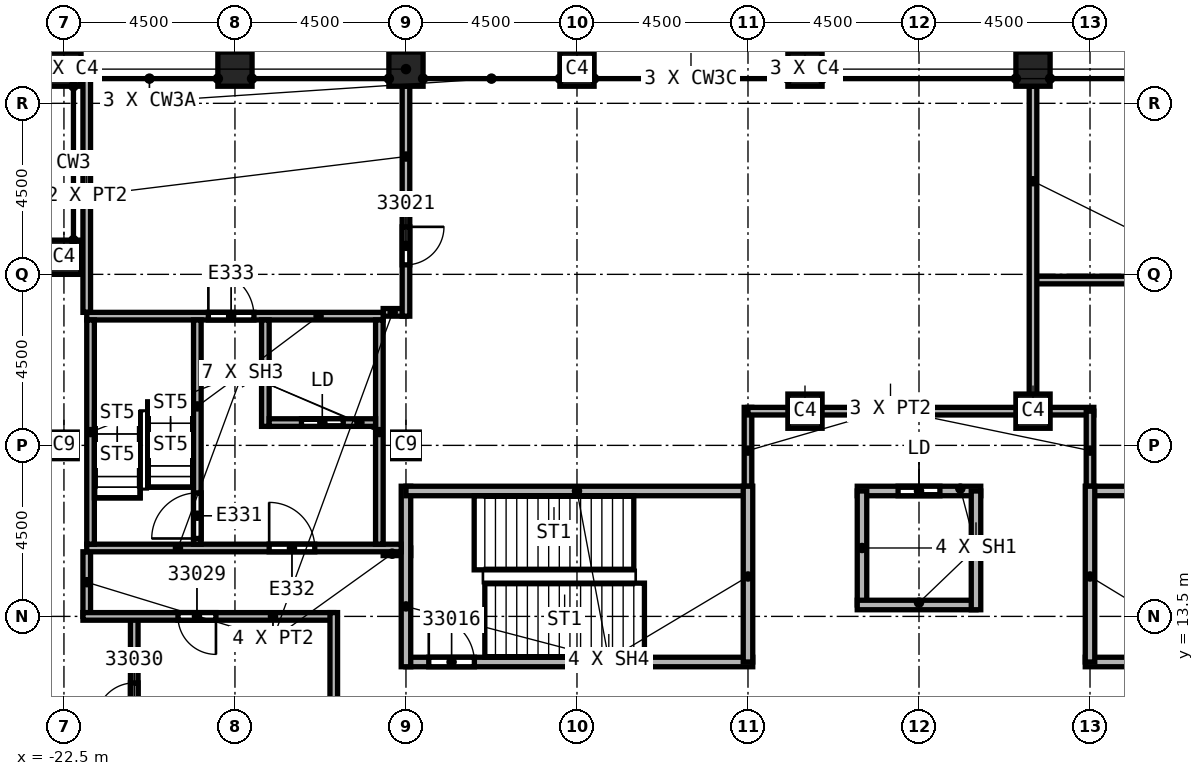
"""IFC4 building model, lengths in metres.
Left out: names, types, materials, properties, quantities, classifications, styles, units other than length and angle.
Written with IfcOpenShell. Run it as: python <this file> out.ifc"""

import sys

from ifc_helpers import new_model, si_unit, direction, frame, frame_2d, origin, origin_2d, place, context, subcontext, project, spatial, rectangle, extrude, element, fill, save


model = new_model("IFC4")
c1 = context("Model", 3, precision=1e-05, world=origin(), true_north=direction((0.0, 1.0)))
c2 = subcontext(c1, "Body", "Model", "MODEL_VIEW")
j1 = project(units=[si_unit("LENGTHUNIT", "METRE"), si_unit("PLANEANGLEUNIT", "RADIAN")], contexts=[c1])
p1 = place(None, origin())
s1 = spatial("IfcSite", under=j1, at=p1, CompositionType="ELEMENT")
p2 = place(p1, origin())
s2 = spatial("IfcBuilding", under=s1, at=p2, CompositionType="ELEMENT")
p3 = place(p2, frame((0.0, 0.0, 361.0)))
s3 = spatial("IfcBuildingStorey", under=s2, at=p3, CompositionType="ELEMENT", Elevation=361.0)
for number, where, z_axis, x_axis in (
    (1, (-13.5, 18.0, 0.0), (0.0, 0.0, 1.0), (1.0, 0.0, 0.0)),
    (2, (-22.5, 18.0, 0.0), (0.0, 0.0, 1.0), (1.0, 0.0, 0.0)),
):
    element("IfcColumn", number, at=place(p3, frame(where, z_axis=z_axis, x_axis=x_axis)), inside=s3, PredefinedType="COLUMN", context=c2, shape_type="SweptSolid", body=[
        extrude(rectangle(XDim=0.7, YDim=0.7, at=origin_2d()), origin(), (0.0, 0.0, 1.0), 4.6),
    ])
for number, where, z_axis, x_axis in (
    (3, (3.0, 27.9, 0.0), (0.0, 0.0, 1.0), (1.0, 0.0, 0.0)),
    (4, (-3.0, 27.9, 0.0), (0.0, 0.0, 1.0), (1.0, 0.0, 0.0)),
    (5, (-9.0, 27.9, 0.0), (0.0, 0.0, 1.0), (1.0, 0.0, 0.0)),
    (6, (-13.5, 27.9, 0.0), (0.0, 0.0, 1.0), (1.0, 0.0, 0.0)),
    (7, (-18.0, 27.9, 0.0), (0.0, 0.0, 1.0), (1.0, 0.0, 0.0)),
    (8, (-22.5, 27.9, 0.0), (0.0, 0.0, 1.0), (1.0, 0.0, 0.0)),
    (9, (3.0, 18.9, 0.0), (0.0, 0.0, 1.0), (1.0, 0.0, 0.0)),
    (10, (-3.0, 18.9, 0.0), (0.0, 0.0, 1.0), (1.0, 0.0, 0.0)),
    (11, (-22.5, 22.95, 0.0), (0.0, 0.0, 1.0), (1.0, 0.0, 0.0)),
):
    element("IfcColumn", number, at=place(p3, frame(where, z_axis=z_axis, x_axis=x_axis)), inside=s3, PredefinedType="COLUMN", context=c2, shape_type="SweptSolid", body=[
        extrude(rectangle(XDim=0.9, YDim=0.9, at=origin_2d()), origin(), (0.0, 0.0, 1.0), 4.6),
    ])
p4 = place(p3, frame((-21.9, 13.5, 0.0), z_axis=(0.0, 0.0, 1.0), x_axis=(0.0, 1.0, 0.0)))
e12 = element("IfcWall", 12, at=p4, inside=s3, PredefinedType="PARTITIONING", context=c2, shape_type="SweptSolid", body=[
    extrude(rectangle(XDim=1.7, YDim=0.2, at=frame_2d((0.85, 0.0))), origin(), (0.0, 0.0, 1.0), 4.15),
])
p5 = place(p3, frame((-21.9, 21.5, 0.0), z_axis=(0.0, 0.0, 1.0), x_axis=(0.0, 1.0, 0.0)))
e13 = element("IfcWall", 13, at=p5, inside=s3, PredefinedType="PARTITIONING", context=c2, shape_type="SweptSolid", body=[
    extrude(rectangle(XDim=6.136, YDim=0.2, at=frame_2d((3.068, 0.0))), origin(), (0.0, 0.0, 1.0), 4.15),
])
p6 = place(p3, frame((-20.65, 9.0, 0.0), z_axis=(0.0, 0.0, 1.0), x_axis=(0.0, 1.0, 0.0)))
e14 = element("IfcWall", 14, at=p6, inside=s3, PredefinedType="PARTITIONING", context=c2, shape_type="SweptSolid", body=[
    extrude(rectangle(XDim=4.5, YDim=0.2, at=frame_2d((2.25, 0.0))), origin(), (0.0, 0.0, 1.0), 4.15),
])
p7 = place(p6, frame((1.75, 0.0, 0.0)))
e15 = element("IfcOpeningElement", 15, at=p7, cuts=e14, PredefinedType="OPENING", context=c2, shape_type="SweptSolid", body=[
    extrude(rectangle(XDim=1.0, YDim=2.1, at=frame_2d((0.5, 1.05))), frame((0.0, 0.1, 0.0), z_axis=(0.0, -1.0, 0.0), x_axis=(1.0, 0.0, 0.0)), (0.0, 0.0, 1.0), 0.2),
])
p8 = place(p3, frame((-15.4, 13.5, 0.0), z_axis=(0.0, 0.0, 1.0), x_axis=(-1.0, 0.0, 0.0)))
e16 = element("IfcWall", 16, at=p8, inside=s3, PredefinedType="PARTITIONING", context=c2, shape_type="SweptSolid", body=[
    extrude(rectangle(XDim=6.6, YDim=0.2, at=frame_2d((3.3, 0.0))), origin(), (0.0, 0.0, 1.0), 4.15),
])
p9 = place(p8, frame((3.1, 0.0, 0.0)))
e17 = element("IfcOpeningElement", 17, at=p9, cuts=e16, PredefinedType="OPENING", context=c2, shape_type="SweptSolid", body=[
    extrude(rectangle(XDim=1.0, YDim=2.1, at=frame_2d((0.5, 1.05))), frame((0.0, 0.1, 0.0), z_axis=(0.0, -1.0, 0.0), x_axis=(1.0, 0.0, 0.0)), (0.0, 0.0, 1.0), 0.2),
])
p10 = place(p3, frame((-15.4, -27.636, 0.0), z_axis=(0.0, 0.0, 1.0), x_axis=(0.0, 1.0, 0.0)))
e18 = element("IfcWall", 18, at=p10, inside=s3, PredefinedType="PARTITIONING", context=c2, shape_type="SweptSolid", body=[
    extrude(rectangle(XDim=41.236, YDim=0.2, at=frame_2d((20.618, 0.0))), origin(), (0.0, 0.0, 1.0), 4.15),
])
p11 = place(p10, frame((30.936, 0.0, 0.0)))
e19 = element("IfcOpeningElement", 19, at=p11, cuts=e18, PredefinedType="OPENING", context=c2, shape_type="SweptSolid", body=[
    extrude(rectangle(XDim=1.0, YDim=2.1, at=frame_2d((0.5, 1.05))), frame((0.0, 0.1, 0.0), z_axis=(0.0, -1.0, 0.0), x_axis=(1.0, 0.0, 0.0)), (0.0, 0.0, 1.0), 0.2),
])
p12 = place(p10, frame((35.436, 0.0, 0.0)))
e20 = element("IfcOpeningElement", 20, at=p12, cuts=e18, PredefinedType="OPENING", context=c2, shape_type="SweptSolid", body=[
    extrude(rectangle(XDim=1.0, YDim=2.1, at=frame_2d((0.5, 1.05))), frame((0.0, 0.1, 0.0), z_axis=(0.0, -1.0, 0.0), x_axis=(1.0, 0.0, 0.0)), (0.0, 0.0, 1.0), 0.2),
])
p13 = place(p10, frame((5.65, 0.0, 0.0)))
e21 = element("IfcOpeningElement", 21, at=p13, cuts=e18, PredefinedType="OPENING", context=c2, shape_type="SweptSolid", body=[
    extrude(rectangle(XDim=1.0, YDim=2.1, at=frame_2d((0.5, 1.05))), frame((0.0, 0.1, 0.0), z_axis=(0.0, -1.0, 0.0), x_axis=(1.0, 0.0, 0.0)), (0.0, 0.0, 1.0), 0.2),
])
p14 = place(p10, frame((19.686, 0.0, 0.0)))
e22 = element("IfcOpeningElement", 22, at=p14, cuts=e18, PredefinedType="OPENING", context=c2, shape_type="SweptSolid", body=[
    extrude(rectangle(XDim=1.0, YDim=2.1, at=frame_2d((0.5, 1.05))), frame((0.0, 0.1, 0.0), z_axis=(0.0, -1.0, 0.0), x_axis=(1.0, 0.0, 0.0)), (0.0, 0.0, 1.0), 0.2),
])
p15 = place(p3, frame((-14.1, 15.2, 0.0), z_axis=(0.0, 0.0, 1.0), x_axis=(1.0, 0.0, 0.0)))
e23 = element("IfcWall", 23, at=p15, inside=s3, PredefinedType="PARTITIONING", context=c2, shape_type="SweptSolid", body=[
    extrude(rectangle(XDim=0.725, YDim=0.2, at=frame_2d((0.363, 0.0))), origin(), (0.0, 0.0, 1.0), 4.15),
])
p16 = place(p3, frame((-13.5, 21.5, 0.0), z_axis=(0.0, 0.0, 1.0), x_axis=(-1.0, 0.0, 0.0)))
e24 = element("IfcWall", 24, at=p16, inside=s3, PredefinedType="PARTITIONING", context=c2, shape_type="SweptSolid", body=[
    extrude(rectangle(XDim=0.6, YDim=0.2, at=frame_2d((0.3, 0.0))), origin(), (0.0, 0.0, 1.0), 4.15),
])
p17 = place(p3, frame((-13.5, 27.45, 0.0), z_axis=(0.0, 0.0, 1.0), x_axis=(0.0, -1.0, 0.0)))
e25 = element("IfcWall", 25, at=p17, inside=s3, PredefinedType="PARTITIONING", context=c2, shape_type="SweptSolid", body=[
    extrude(rectangle(XDim=6.05, YDim=0.2, at=frame_2d((3.025, 0.0))), origin(), (0.0, 0.0, 1.0), 4.15),
])
p18 = place(p17, frame((3.7, 0.0, 0.0)))
e26 = element("IfcOpeningElement", 26, at=p18, cuts=e25, PredefinedType="OPENING", context=c2, shape_type="SweptSolid", body=[
    extrude(rectangle(XDim=1.0, YDim=2.1, at=frame_2d((0.5, 1.05))), frame((0.0, 0.1, 0.0), z_axis=(0.0, -1.0, 0.0), x_axis=(1.0, 0.0, 0.0)), (0.0, 0.0, 1.0), 0.2),
])
p19 = place(p3, frame((-4.5, 16.8, 0.0), z_axis=(0.0, 0.0, 1.0), x_axis=(0.0, 1.0, 0.0)))
e27 = element("IfcWall", 27, at=p19, inside=s3, PredefinedType="PARTITIONING", context=c2, shape_type="SweptSolid", body=[
    extrude(rectangle(XDim=2.2, YDim=0.2, at=frame_2d((1.1, 0.0))), origin(), (0.0, 0.0, 1.0), 4.15),
])
p20 = place(p3, frame((-4.5, 18.9, 0.0), z_axis=(0.0, 0.0, 1.0), x_axis=(1.0, 0.0, 0.0)))
e28 = element("IfcWall", 28, at=p20, inside=s3, PredefinedType="PARTITIONING", context=c2, shape_type="SweptSolid", body=[
    extrude(rectangle(XDim=9.1, YDim=0.2, at=frame_2d((4.55, 0.0))), origin(), (0.0, 0.0, 1.0), 4.15),
])
p21 = place(p3, frame((3.0, 22.35, 0.0), z_axis=(0.0, 0.0, 1.0), x_axis=(1.0, 0.0, 0.0)))
e29 = element("IfcWall", 29, at=p21, inside=s3, PredefinedType="PARTITIONING", context=c2, shape_type="SweptSolid", body=[
    extrude(rectangle(XDim=10.5, YDim=0.2, at=frame_2d((5.25, 0.0))), origin(), (0.0, 0.0, 1.0), 4.15),
])
p22 = place(p3, frame((3.0, 27.45, 0.0), z_axis=(0.0, 0.0, 1.0), x_axis=(0.0, -1.0, 0.0)))
e30 = element("IfcWall", 30, at=p22, inside=s3, PredefinedType="PARTITIONING", context=c2, shape_type="SweptSolid", body=[
    extrude(rectangle(XDim=8.55, YDim=0.2, at=frame_2d((4.275, 0.0))), origin(), (0.0, 0.0, 1.0), 4.15),
])
p23 = place(p3, frame((4.5, 18.9, 0.0), z_axis=(0.0, 0.0, 1.0), x_axis=(0.0, -1.0, 0.0)))
e31 = element("IfcWall", 31, at=p23, inside=s3, PredefinedType="PARTITIONING", context=c2, shape_type="SweptSolid", body=[
    extrude(rectangle(XDim=2.1, YDim=0.2, at=frame_2d((1.05, 0.0))), origin(), (0.0, 0.0, 1.0), 4.15),
])
p24 = place(p3, frame((-1.625, 16.8, 0.0), z_axis=(0.0, 0.0, 1.0), x_axis=(1.0, 0.0, 0.0)))
e32 = element("IfcWall", 32, at=p24, inside=s3, PredefinedType="SOLIDWALL", context=c2, shape_type="SweptSolid", body=[
    extrude(rectangle(XDim=3.25, YDim=0.25, at=frame_2d((1.625, 0.0))), origin(), (0.0, 0.0, 1.0), 4.15),
])
p25 = place(p24, frame((1.075, 0.0, 0.0)))
e33 = element("IfcOpeningElement", 33, at=p25, cuts=e32, PredefinedType="OPENING", context=c2, shape_type="SweptSolid", body=[
    extrude(rectangle(XDim=1.1, YDim=2.1, at=frame_2d((0.55, 1.05))), frame((0.0, 0.125, 0.0), z_axis=(0.0, -1.0, 0.0), x_axis=(1.0, 0.0, 0.0)), (0.0, 0.0, 1.0), 0.25),
])
p26 = place(p3, frame((-1.5, 13.8, 0.0), z_axis=(0.0, 0.0, 1.0), x_axis=(0.0, 1.0, 0.0)))
e34 = element("IfcWall", 34, at=p26, inside=s3, PredefinedType="SOLIDWALL", context=c2, shape_type="SweptSolid", body=[
    extrude(rectangle(XDim=3.0, YDim=0.25, at=frame_2d((1.5, 0.0))), origin(), (0.0, 0.0, 1.0), 4.15),
])
for number, where, z_axis, x_axis in (
    (35, (1.5, 13.8, 0.0), (0.0, 0.0, 1.0), (-1.0, 0.0, 0.0)),
    (36, (1.5, 16.8, 0.0), (0.0, 0.0, 1.0), (0.0, -1.0, 0.0)),
):
    element("IfcWall", number, at=place(p3, frame(where, z_axis=z_axis, x_axis=x_axis)), inside=s3, PredefinedType="SOLIDWALL", context=c2, shape_type="SweptSolid", body=[
        extrude(rectangle(XDim=3.125, YDim=0.25, at=frame_2d((1.562, 0.0))), origin(), (0.0, 0.0, 1.0), 4.15),
    ])
p27 = place(p3, frame((-13.5, 12.3, 0.0), z_axis=(0.0, 0.0, 1.0), x_axis=(1.0, 0.0, 0.0)))
e37 = element("IfcWall", 37, at=p27, inside=s3, PredefinedType="SOLIDWALL", context=c2, shape_type="SweptSolid", body=[
    extrude(rectangle(XDim=9.125, YDim=0.25, at=frame_2d((4.562, 0.0))), origin(), (0.0, 0.0, 1.0), 4.15),
])
p28 = place(p27, frame((0.6, 0.0, 0.0)))
e38 = element("IfcOpeningElement", 38, at=p28, cuts=e37, PredefinedType="OPENING", context=c2, shape_type="SweptSolid", body=[
    extrude(rectangle(XDim=1.2, YDim=2.1, at=frame_2d((0.6, 1.05))), frame((0.0, 0.125, 0.0), z_axis=(0.0, -1.0, 0.0), x_axis=(1.0, 0.0, 0.0)), (0.0, 0.0, 1.0), 0.25),
])
p29 = place(p3, frame((-13.5, 12.175, 0.0), z_axis=(0.0, 0.0, 1.0), x_axis=(0.0, 1.0, 0.0)))
e39 = element("IfcWall", 39, at=p29, inside=s3, PredefinedType="SOLIDWALL", context=c2, shape_type="SweptSolid", body=[
    extrude(rectangle(XDim=4.75, YDim=0.25, at=frame_2d((2.375, 0.0))), origin(), (0.0, 0.0, 1.0), 4.15),
])
p30 = place(p3, frame((-13.5, 16.8, 0.0), z_axis=(0.0, 0.0, 1.0), x_axis=(1.0, 0.0, 0.0)))
e40 = element("IfcWall", 40, at=p30, inside=s3, PredefinedType="SOLIDWALL", context=c2, shape_type="SweptSolid", body=[
    extrude(rectangle(XDim=9.1, YDim=0.25, at=frame_2d((4.55, 0.0))), origin(), (0.0, 0.0, 1.0), 4.15),
])
p31 = place(p3, frame((-4.5, 16.925, 0.0), z_axis=(0.0, 0.0, 1.0), x_axis=(0.0, -1.0, 0.0)))
e41 = element("IfcWall", 41, at=p31, inside=s3, PredefinedType="SOLIDWALL", context=c2, shape_type="SweptSolid", body=[
    extrude(rectangle(XDim=4.625, YDim=0.25, at=frame_2d((2.312, 0.0))), origin(), (0.0, 0.0, 1.0), 4.15),
])
p32 = place(p3, frame((4.375, 12.3, 0.0), z_axis=(0.0, 0.0, 1.0), x_axis=(1.0, 0.0, 0.0)))
e42 = element("IfcWall", 42, at=p32, inside=s3, PredefinedType="SOLIDWALL", context=c2, shape_type="SweptSolid", body=[
    extrude(rectangle(XDim=9.125, YDim=0.25, at=frame_2d((4.562, 0.0))), origin(), (0.0, 0.0, 1.0), 4.15),
])
p33 = place(p32, frame((7.2, 0.0, 0.0)))
e43 = element("IfcOpeningElement", 43, at=p33, cuts=e42, PredefinedType="OPENING", context=c2, shape_type="SweptSolid", body=[
    extrude(rectangle(XDim=1.2, YDim=2.1, at=frame_2d((0.6, 1.05))), frame((0.0, 0.125, 0.0), z_axis=(0.0, -1.0, 0.0), x_axis=(1.0, 0.0, 0.0)), (0.0, 0.0, 1.0), 0.25),
])
p34 = place(p3, frame((4.4, 16.8, 0.0), z_axis=(0.0, 0.0, 1.0), x_axis=(1.0, 0.0, 0.0)))
e44 = element("IfcWall", 44, at=p34, inside=s3, PredefinedType="SOLIDWALL", context=c2, shape_type="SweptSolid", body=[
    extrude(rectangle(XDim=9.1, YDim=0.25, at=frame_2d((4.55, 0.0))), origin(), (0.0, 0.0, 1.0), 4.15),
])
p35 = place(p3, frame((4.5, 12.3, 0.0), z_axis=(0.0, 0.0, 1.0), x_axis=(0.0, 1.0, 0.0)))
e45 = element("IfcWall", 45, at=p35, inside=s3, PredefinedType="SOLIDWALL", context=c2, shape_type="SweptSolid", body=[
    extrude(rectangle(XDim=4.625, YDim=0.25, at=frame_2d((2.312, 0.0))), origin(), (0.0, 0.0, 1.0), 4.15),
])
p36 = place(p3, frame((-21.9, 15.3, 0.0), z_axis=(0.0, 0.0, 1.0), x_axis=(1.0, 0.0, 0.0)))
e46 = element("IfcWall", 46, at=p36, inside=s3, PredefinedType="SOLIDWALL", context=c2, shape_type="SweptSolid", body=[
    extrude(rectangle(XDim=8.275, YDim=0.2, at=frame_2d((4.137, 0.0))), origin(), (0.0, 0.0, 1.0), 4.15),
])
p37 = place(p36, frame((4.8, 0.0, 0.0)))
e47 = element("IfcOpeningElement", 47, at=p37, cuts=e46, PredefinedType="OPENING", context=c2, shape_type="SweptSolid", body=[
    extrude(rectangle(XDim=1.2, YDim=2.1, at=frame_2d((0.6, 1.05))), frame((0.0, 0.1, 0.0), z_axis=(0.0, -1.0, 0.0), x_axis=(1.0, 0.0, 0.0)), (0.0, 0.0, 1.0), 0.2),
])
p38 = place(p3, frame((-21.9, 21.4, 0.0), z_axis=(0.0, 0.0, 1.0), x_axis=(1.0, 0.0, 0.0)))
e48 = element("IfcWall", 48, at=p38, inside=s3, PredefinedType="SOLIDWALL", context=c2, shape_type="SweptSolid", body=[
    extrude(rectangle(XDim=7.8, YDim=0.2, at=frame_2d((3.9, 0.0))), origin(), (0.0, 0.0, 1.0), 4.15),
])
p39 = place(p38, frame((3.2, 0.0, 0.0)))
e49 = element("IfcOpeningElement", 49, at=p39, cuts=e48, PredefinedType="OPENING", context=c2, shape_type="SweptSolid", body=[
    extrude(rectangle(XDim=1.2, YDim=2.1, at=frame_2d((0.6, 1.05))), frame((0.0, 0.1, 0.0), z_axis=(0.0, -1.0, 0.0), x_axis=(1.0, 0.0, 0.0)), (0.0, 0.0, 1.0), 0.2),
])
for number, where, z_axis, x_axis in (
    (50, (-21.8, 15.4, 0.0), (0.0, 0.0, 1.0), (0.0, 1.0, 0.0)),
    (51, (-14.2, 15.4, 0.0), (0.0, 0.0, 1.0), (0.0, 1.0, 0.0)),
):
    element("IfcWall", number, at=place(p3, frame(where, z_axis=z_axis, x_axis=x_axis)), inside=s3, PredefinedType="SOLIDWALL", context=c2, shape_type="SweptSolid", body=[
        extrude(rectangle(XDim=5.9, YDim=0.2, at=frame_2d((2.95, 0.0))), origin(), (0.0, 0.0, 1.0), 4.15),
    ])
p40 = place(p3, frame((-18.99, 15.4, 0.0), z_axis=(0.0, 0.0, 1.0), x_axis=(0.0, 1.0, 0.0)))
e52 = element("IfcWall", 52, at=p40, inside=s3, PredefinedType="SOLIDWALL", context=c2, shape_type="SweptSolid", body=[
    extrude(rectangle(XDim=5.9, YDim=0.2, at=frame_2d((2.95, 0.0))), origin(), (0.0, 0.0, 1.0), 4.15),
])
p41 = place(p40, frame((0.15, 0.0, 0.0)))
e53 = element("IfcOpeningElement", 53, at=p41, cuts=e52, PredefinedType="OPENING", context=c2, shape_type="SweptSolid", body=[
    extrude(rectangle(XDim=1.2, YDim=2.1, at=frame_2d((0.6, 1.05))), frame((0.0, 0.1, 0.0), z_axis=(0.0, -1.0, 0.0), x_axis=(1.0, 0.0, 0.0)), (0.0, 0.0, 1.0), 0.2),
])
p42 = place(p3, frame((-17.2, 18.5, 0.0), z_axis=(0.0, 0.0, 1.0), x_axis=(0.0, 1.0, 0.0)))
e54 = element("IfcWall", 54, at=p42, inside=s3, PredefinedType="SOLIDWALL", context=c2, shape_type="SweptSolid", body=[
    extrude(rectangle(XDim=2.8, YDim=0.2, at=frame_2d((1.4, 0.0))), origin(), (0.0, 0.0, 1.0), 4.15),
])
p43 = place(p3, frame((-17.1, 18.6, 0.0), z_axis=(0.0, 0.0, 1.0), x_axis=(1.0, 0.0, 0.0)))
e55 = element("IfcWall", 55, at=p43, inside=s3, PredefinedType="SOLIDWALL", context=c2, shape_type="SweptSolid", body=[
    extrude(rectangle(XDim=2.8, YDim=0.2, at=frame_2d((1.4, 0.0))), origin(), (0.0, 0.0, 1.0), 4.15),
])
p44 = place(p43, frame((0.85, 0.0, 0.0)))
e56 = element("IfcOpeningElement", 56, at=p44, cuts=e55, PredefinedType="OPENING", context=c2, shape_type="SweptSolid", body=[
    extrude(rectangle(XDim=1.1, YDim=2.1, at=frame_2d((0.55, 1.05))), frame((0.0, 0.1, 0.0), z_axis=(0.0, -1.0, 0.0), x_axis=(1.0, 0.0, 0.0)), (0.0, 0.0, 1.0), 0.2),
])
p45 = place(p28, origin())
e57 = element("IfcDoor", 57, at=p45, inside=s3, OperationType="SINGLE_SWING_LEFT", PredefinedType="DOOR", context=c2, shape_type="SweptSolid", body=[
    extrude(rectangle(XDim=1.2, YDim=2.1, at=frame_2d((0.6, 1.05))), frame((0.0, 0.025, 0.0), z_axis=(0.0, -1.0, 0.0), x_axis=(1.0, 0.0, 0.0)), (0.0, 0.0, 1.0), 0.05),
])
fill(e38, e57)
p46 = place(p18, origin())
e58 = element("IfcDoor", 58, at=p46, inside=s3, OperationType="SINGLE_SWING_RIGHT", PredefinedType="DOOR", context=c2, shape_type="SweptSolid", body=[
    extrude(rectangle(XDim=1.0, YDim=2.1, at=frame_2d((0.5, 1.05))), frame((0.0, 0.025, 0.0), z_axis=(0.0, -1.0, 0.0), x_axis=(1.0, 0.0, 0.0)), (0.0, 0.0, 1.0), 0.05),
])
fill(e26, e58)
p47 = place(p9, origin())
e59 = element("IfcDoor", 59, at=p47, inside=s3, OperationType="SINGLE_SWING_RIGHT", PredefinedType="DOOR", context=c2, shape_type="SweptSolid", body=[
    extrude(rectangle(XDim=1.0, YDim=2.1, at=frame_2d((0.5, 1.05))), frame((0.0, 0.025, 0.0), z_axis=(0.0, -1.0, 0.0), x_axis=(1.0, 0.0, 0.0)), (0.0, 0.0, 1.0), 0.05),
])
fill(e17, e59)
p48 = place(p7, origin())
e60 = element("IfcDoor", 60, at=p48, inside=s3, OperationType="SINGLE_SWING_LEFT", PredefinedType="DOOR", context=c2, shape_type="SweptSolid", body=[
    extrude(rectangle(XDim=1.0, YDim=2.1, at=frame_2d((0.5, 1.05))), frame((0.0, 0.025, 0.0), z_axis=(0.0, -1.0, 0.0), x_axis=(1.0, 0.0, 0.0)), (0.0, 0.0, 1.0), 0.05),
])
fill(e15, e60)
p49 = place(p25, origin())
e61 = element("IfcDoor", 61, at=p49, inside=s3, OperationType="SLIDING_TO_LEFT", PredefinedType="DOOR", context=c2, shape_type="SweptSolid", body=[
    extrude(rectangle(XDim=1.1, YDim=2.1, at=frame_2d((0.55, 1.05))), frame((0.0, 0.025, 0.0), z_axis=(0.0, -1.0, 0.0), x_axis=(1.0, 0.0, 0.0)), (0.0, 0.0, 1.0), 0.05),
])
fill(e33, e61)
p50 = place(p41, origin())
e62 = element("IfcDoor", 62, at=p50, inside=s3, OperationType="SINGLE_SWING_LEFT", PredefinedType="DOOR", context=c2, shape_type="SweptSolid", body=[
    extrude(rectangle(XDim=1.2, YDim=2.1, at=frame_2d((0.6, 1.05))), frame((0.0, 0.025, 0.0), z_axis=(0.0, -1.0, 0.0), x_axis=(1.0, 0.0, 0.0)), (0.0, 0.0, 1.0), 0.05),
])
fill(e53, e62)
p51 = place(p44, origin())
e63 = element("IfcDoor", 63, at=p51, inside=s3, OperationType="SLIDING_TO_LEFT", PredefinedType="DOOR", context=c2, shape_type="SweptSolid", body=[
    extrude(rectangle(XDim=1.1, YDim=2.1, at=frame_2d((0.55, 1.05))), frame((0.0, 0.025, 0.0), z_axis=(0.0, -1.0, 0.0), x_axis=(1.0, 0.0, 0.0)), (0.0, 0.0, 1.0), 0.05),
])
fill(e56, e63)
p52 = place(p37, origin())
e64 = element("IfcDoor", 64, at=p52, inside=s3, OperationType="SINGLE_SWING_RIGHT", PredefinedType="DOOR", context=c2, shape_type="SweptSolid", body=[
    extrude(rectangle(XDim=1.2, YDim=2.1, at=frame_2d((0.6, 1.05))), frame((0.0, 0.025, 0.0), z_axis=(0.0, -1.0, 0.0), x_axis=(1.0, 0.0, 0.0)), (0.0, 0.0, 1.0), 0.05),
])
fill(e47, e64)
p53 = place(p39, origin())
e65 = element("IfcDoor", 65, at=p53, inside=s3, OperationType="SINGLE_SWING_LEFT", PredefinedType="DOOR", context=c2, shape_type="SweptSolid", body=[
    extrude(rectangle(XDim=1.2, YDim=2.1, at=frame_2d((0.6, 1.05))), frame((0.0, 0.025, 0.0), z_axis=(0.0, -1.0, 0.0), x_axis=(1.0, 0.0, 0.0)), (0.0, 0.0, 1.0), 0.05),
])
fill(e49, e65)
save(model, sys.argv[1])
